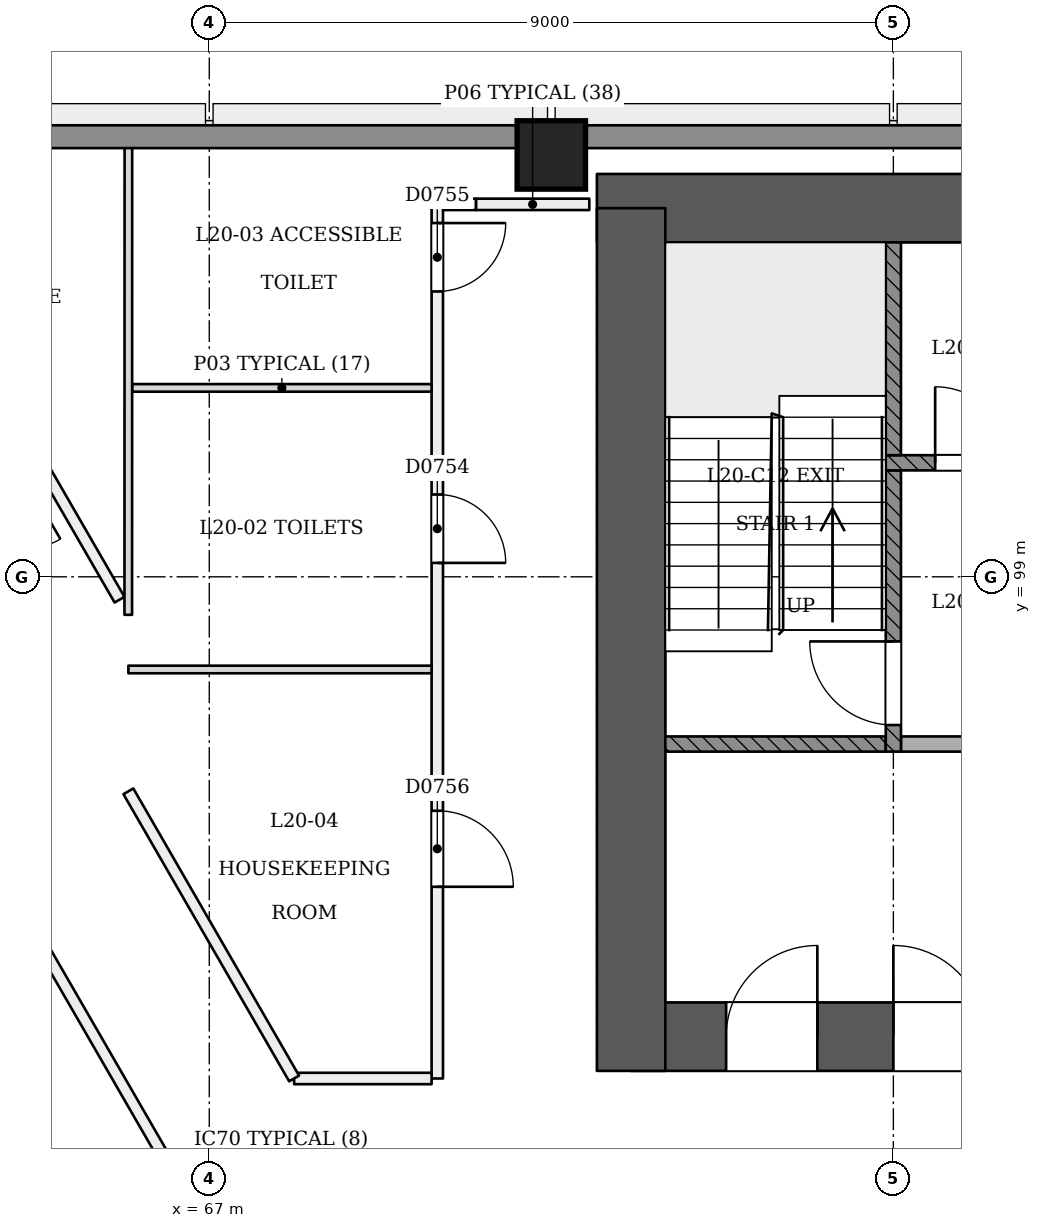
"""IFC4 building model, lengths in metres.
Left out: names, types, materials, properties, quantities, classifications, styles, units other than length and angle.
Written with IfcOpenShell. Run it as: python <this file> out.ifc"""

import sys

from ifc_helpers import new_model, si_unit, direction, frame, frame_2d, origin, origin_2d, place, context, subcontext, project, spatial, rectangle, extrude, element, fill, save


model = new_model("IFC4")
c1 = context("Model", 3, precision=1e-05, world=origin(), true_north=direction((0.0, 1.0)))
c2 = subcontext(c1, "Body", "Model", "MODEL_VIEW")
j1 = project(units=[si_unit("LENGTHUNIT", "METRE"), si_unit("PLANEANGLEUNIT", "RADIAN")], contexts=[c1])
p1 = place(None, origin())
s1 = spatial("IfcSite", under=j1, at=p1, CompositionType="ELEMENT")
p2 = place(p1, origin())
s2 = spatial("IfcBuilding", under=s1, at=p2, CompositionType="ELEMENT")
p3 = place(p2, frame((0.0, 0.0, 81.0)))
s3 = spatial("IfcBuildingStorey", under=s2, at=p3, CompositionType="ELEMENT", Elevation=81.0)
p4 = place(p3, frame((72.55, 92.95, 0.0), z_axis=(0.0, 0.0, 1.0), x_axis=(1.0, 0.0, 0.0)))
e1 = element("IfcWall", 1, at=p4, inside=s3, PredefinedType="SHEAR", context=c2, shape_type="SweptSolid", body=[
    extrude(rectangle(XDim=25.35, YDim=0.9, at=frame_2d((12.675, 0.0))), origin(), (0.0, 0.0, 1.0), 3.6),
])
p5 = place(p4, frame((1.25, 0.0, 0.0)))
e2 = element("IfcOpeningElement", 2, at=p5, cuts=e1, PredefinedType="OPENING", context=c2, shape_type="SweptSolid", body=[
    extrude(rectangle(XDim=1.2, YDim=2.1, at=frame_2d((0.6, 1.05))), frame((0.0, 0.46, 0.0), z_axis=(0.0, -1.0, 0.0), x_axis=(1.0, 0.0, 0.0)), (0.0, 0.0, 1.0), 0.921),
])
p6 = place(p4, frame((3.45, 0.0, 0.0)))
e3 = element("IfcOpeningElement", 3, at=p6, cuts=e1, PredefinedType="OPENING", context=c2, shape_type="SweptSolid", body=[
    extrude(rectangle(XDim=1.2, YDim=2.1, at=frame_2d((0.6, 1.05))), frame((0.0, 0.46, 0.0), z_axis=(0.0, -1.0, 0.0), x_axis=(1.0, 0.0, 0.0)), (0.0, 0.0, 1.0), 0.921),
])
p7 = place(p4, frame((13.45, 0.0, 0.0)))
e4 = element("IfcOpeningElement", 4, at=p7, cuts=e1, PredefinedType="OPENING", context=c2, shape_type="SweptSolid", body=[
    extrude(rectangle(XDim=1.2, YDim=2.1, at=frame_2d((0.6, 1.05))), frame((0.0, 0.46, 0.0), z_axis=(0.0, -1.0, 0.0), x_axis=(1.0, 0.0, 0.0)), (0.0, 0.0, 1.0), 0.921),
])
p8 = place(p4, frame((15.913, 0.0, 0.0)))
e5 = element("IfcOpeningElement", 5, at=p8, cuts=e1, PredefinedType="OPENING", context=c2, shape_type="SweptSolid", body=[
    extrude(rectangle(XDim=1.0, YDim=2.1, at=frame_2d((0.5, 1.05))), frame((0.0, 0.46, 0.0), z_axis=(0.0, -1.0, 0.0), x_axis=(1.0, 0.0, 0.0)), (0.0, 0.0, 1.0), 0.921),
])
p9 = place(p4, frame((18.35, 0.0, 0.0)))
e6 = element("IfcOpeningElement", 6, at=p9, cuts=e1, PredefinedType="OPENING", context=c2, shape_type="SweptSolid", body=[
    extrude(rectangle(XDim=1.0, YDim=2.1, at=frame_2d((0.5, 1.05))), frame((0.0, 0.46, 0.0), z_axis=(0.0, -1.0, 0.0), x_axis=(1.0, 0.0, 0.0)), (0.0, 0.0, 1.0), 0.921),
])
p10 = place(p4, frame((20.7, 0.0, 0.0)))
e7 = element("IfcOpeningElement", 7, at=p10, cuts=e1, PredefinedType="OPENING", context=c2, shape_type="SweptSolid", body=[
    extrude(rectangle(XDim=1.0, YDim=2.1, at=frame_2d((0.5, 1.05))), frame((0.0, 0.46, 0.0), z_axis=(0.0, -1.0, 0.0), x_axis=(1.0, 0.0, 0.0)), (0.0, 0.0, 1.0), 0.921),
])
p11 = place(p4, frame((22.988, 0.0, 0.0)))
e8 = element("IfcOpeningElement", 8, at=p11, cuts=e1, PredefinedType="OPENING", context=c2, shape_type="SweptSolid", body=[
    extrude(rectangle(XDim=1.0, YDim=2.1, at=frame_2d((0.5, 1.05))), frame((0.0, 0.46, 0.0), z_axis=(0.0, -1.0, 0.0), x_axis=(1.0, 0.0, 0.0)), (0.0, 0.0, 1.0), 0.921),
])
p12 = place(p3, frame((97.45, 103.85, 0.0), z_axis=(0.0, 0.0, 1.0), x_axis=(-1.0, 0.0, 0.0)))
e9 = element("IfcWall", 9, at=p12, inside=s3, PredefinedType="SHEAR", context=c2, shape_type="SweptSolid", body=[
    extrude(rectangle(XDim=25.35, YDim=0.9, at=frame_2d((12.675, 0.0))), origin(), (0.0, 0.0, 1.0), 3.6),
])
p13 = place(p3, frame((72.55, 103.85, 0.0), z_axis=(0.0, 0.0, 1.0), x_axis=(0.0, -1.0, 0.0)))
e10 = element("IfcWall", 10, at=p13, inside=s3, PredefinedType="SHEAR", context=c2, shape_type="SweptSolid", body=[
    extrude(rectangle(XDim=11.35, YDim=0.9, at=frame_2d((5.675, 0.0))), origin(), (0.0, 0.0, 1.0), 3.6),
])
p14 = place(p3, frame((71.5, 104.55, 0.0), z_axis=(0.0, 0.0, 1.0), x_axis=(1.0, 0.0, 0.0)))
e11 = element("IfcColumn", 11, at=p14, inside=s3, PredefinedType="COLUMN", context=c2, shape_type="SweptSolid", body=[
    extrude(rectangle(XDim=0.9, YDim=0.9, at=origin_2d()), origin(), (0.0, 0.0, 1.0), 3.6),
])
p15 = place(p3, frame((72.0, 103.9, 0.0), z_axis=(0.0, 0.0, 1.0), x_axis=(-1.0, 0.0, 0.0)))
e12 = element("IfcWall", 12, at=p15, inside=s3, PredefinedType="PARTITIONING", context=c2, shape_type="SweptSolid", body=[
    extrude(rectangle(XDim=1.492, YDim=0.15, at=frame_2d((0.746, 0.0))), origin(), (0.0, 0.0, 1.0), 3.1),
])
p16 = place(p3, frame((70.508, 103.9, 0.0), z_axis=(0.0, 0.0, 1.0), x_axis=(-1.0, 0.0, 0.0)))
e13 = element("IfcWall", 13, at=p16, inside=s3, PredefinedType="PARTITIONING", context=c2, shape_type="SweptSolid", body=[
    extrude(rectangle(XDim=0.433, YDim=0.15, at=frame_2d((0.217, 0.0))), origin(), (0.0, 0.0, 1.0), 2.6),
])
p17 = place(p3, frame((70.0, 103.9, 0.0), z_axis=(0.0, 0.0, 1.0), x_axis=(0.0, -1.0, 0.0)))
e14 = element("IfcWall", 14, at=p17, inside=s3, PredefinedType="PARTITIONING", context=c2, shape_type="SweptSolid", body=[
    extrude(rectangle(XDim=11.5, YDim=0.15, at=frame_2d((5.75, 0.0))), origin(), (0.0, 0.0, 1.0), 2.6),
])
p18 = place(p17, frame((3.817, 0.0, 0.0)))
e15 = element("IfcOpeningElement", 15, at=p18, cuts=e14, PredefinedType="OPENING", context=c2, shape_type="SweptSolid", body=[
    extrude(rectangle(XDim=0.9, YDim=2.1, at=frame_2d((0.45, 1.05))), frame((0.0, 0.085, 0.0), z_axis=(0.0, -1.0, 0.0), x_axis=(1.0, 0.0, 0.0)), (0.0, 0.0, 1.0), 0.171),
])
p19 = place(p17, frame((0.246, 0.0, 0.0)))
e16 = element("IfcOpeningElement", 16, at=p19, cuts=e14, PredefinedType="OPENING", context=c2, shape_type="SweptSolid", body=[
    extrude(rectangle(XDim=0.9, YDim=2.1, at=frame_2d((0.45, 1.05))), frame((0.0, 0.085, 0.0), z_axis=(0.0, -1.0, 0.0), x_axis=(1.0, 0.0, 0.0)), (0.0, 0.0, 1.0), 0.171),
])
p20 = place(p17, frame((7.978, 0.0, 0.0)))
e17 = element("IfcOpeningElement", 17, at=p20, cuts=e14, PredefinedType="OPENING", context=c2, shape_type="SweptSolid", body=[
    extrude(rectangle(XDim=1.0, YDim=2.1, at=frame_2d((0.5, 1.05))), frame((0.0, 0.085, 0.0), z_axis=(0.0, -1.0, 0.0), x_axis=(1.0, 0.0, 0.0)), (0.0, 0.0, 1.0), 0.171),
])
p21 = place(p3, frame((69.925, 92.4, 0.0), z_axis=(0.0, 0.0, 1.0), x_axis=(-1.0, 0.0, 0.0)))
e18 = element("IfcWall", 18, at=p21, inside=s3, PredefinedType="PARTITIONING", context=c2, shape_type="SweptSolid", body=[
    extrude(rectangle(XDim=1.809, YDim=0.15, at=frame_2d((0.904, 0.0))), origin(), (0.0, 0.0, 1.0), 3.1),
])
p22 = place(p3, frame((68.116, 92.4, 0.0), z_axis=(0.0, 0.0, 1.0), x_axis=(-0.499787053524, 0.866148313587, 0.0)))
e19 = element("IfcWall", 19, at=p22, inside=s3, PredefinedType="PARTITIONING", context=c2, shape_type="SweptSolid", body=[
    extrude(rectangle(XDim=4.362, YDim=0.15, at=frame_2d((2.181, 0.0))), origin(), (0.0, 0.0, 1.0), 3.1),
])
p23 = place(p3, frame((65.819, 98.699, 0.0), z_axis=(0.0, 0.0, 1.0), x_axis=(-0.499990056298, 0.866031144707, 0.0)))
e20 = element("IfcWall", 20, at=p23, inside=s3, PredefinedType="PARTITIONING", context=c2, shape_type="SweptSolid", body=[
    extrude(rectangle(XDim=2.08, YDim=0.15, at=frame_2d((1.04, 0.0))), origin(), (0.0, 0.0, 1.0), 3.1),
])
p24 = place(p3, frame((62.955, 97.34, 0.0), z_axis=(0.0, 0.0, 1.0), x_axis=(0.500000604257, -0.866025054916, 0.0)))
e21 = element("IfcWall", 21, at=p24, inside=s3, PredefinedType="PARTITIONING", context=c2, shape_type="SweptSolid", body=[
    extrude(rectangle(XDim=42.75, YDim=0.15, at=frame_2d((21.375, 0.0))), origin(), (0.0, 0.0, 1.0), 2.7),
])
p25 = place(p24, frame((0.245, 0.0, 0.0)))
e22 = element("IfcOpeningElement", 22, at=p25, cuts=e21, PredefinedType="OPENING", context=c2, shape_type="SweptSolid", body=[
    extrude(rectangle(XDim=1.2, YDim=2.1, at=frame_2d((0.6, 1.05))), frame((0.0, 0.085, 0.0), z_axis=(0.0, -1.0, 0.0), x_axis=(1.0, 0.0, 0.0)), (0.0, 0.0, 1.0), 0.171),
])
p26 = place(p24, frame((8.375, 0.0, 0.0)))
e23 = element("IfcOpeningElement", 23, at=p26, cuts=e21, PredefinedType="OPENING", context=c2, shape_type="SweptSolid", body=[
    extrude(rectangle(XDim=1.2, YDim=2.1, at=frame_2d((0.6, 1.05))), frame((0.0, 0.085, 0.0), z_axis=(0.0, -1.0, 0.0), x_axis=(1.0, 0.0, 0.0)), (0.0, 0.0, 1.0), 0.171),
])
p27 = place(p24, frame((14.125, 0.0, 0.0)))
e24 = element("IfcOpeningElement", 24, at=p27, cuts=e21, PredefinedType="OPENING", context=c2, shape_type="SweptSolid", body=[
    extrude(rectangle(XDim=1.0, YDim=2.1, at=frame_2d((0.5, 1.05))), frame((0.0, 0.085, 0.0), z_axis=(0.0, -1.0, 0.0), x_axis=(1.0, 0.0, 0.0)), (0.0, 0.0, 1.0), 0.171),
])
p28 = place(p24, frame((18.625, 0.0, 0.0)))
e25 = element("IfcOpeningElement", 25, at=p28, cuts=e21, PredefinedType="OPENING", context=c2, shape_type="SweptSolid", body=[
    extrude(rectangle(XDim=1.0, YDim=2.1, at=frame_2d((0.5, 1.05))), frame((0.0, 0.085, 0.0), z_axis=(0.0, -1.0, 0.0), x_axis=(1.0, 0.0, 0.0)), (0.0, 0.0, 1.0), 0.171),
])
p29 = place(p24, frame((26.375, 0.0, 0.0)))
e26 = element("IfcOpeningElement", 26, at=p29, cuts=e21, PredefinedType="OPENING", context=c2, shape_type="SweptSolid", body=[
    extrude(rectangle(XDim=1.2, YDim=2.1, at=frame_2d((0.6, 1.05))), frame((0.0, 0.085, 0.0), z_axis=(0.0, -1.0, 0.0), x_axis=(1.0, 0.0, 0.0)), (0.0, 0.0, 1.0), 0.171),
])
p30 = place(p24, frame((30.946, 0.0, 0.0)))
e27 = element("IfcOpeningElement", 27, at=p30, cuts=e21, PredefinedType="OPENING", context=c2, shape_type="SweptSolid", body=[
    extrude(rectangle(XDim=1.1, YDim=2.1, at=frame_2d((0.55, 1.05))), frame((0.0, 0.085, 0.0), z_axis=(0.0, -1.0, 0.0), x_axis=(1.0, 0.0, 0.0)), (0.0, 0.0, 1.0), 0.171),
])
p31 = place(p24, frame((36.625, 0.0, 0.0)))
e28 = element("IfcOpeningElement", 28, at=p31, cuts=e21, PredefinedType="OPENING", context=c2, shape_type="SweptSolid", body=[
    extrude(rectangle(XDim=1.0, YDim=2.1, at=frame_2d((0.5, 1.05))), frame((0.0, 0.085, 0.0), z_axis=(0.0, -1.0, 0.0), x_axis=(1.0, 0.0, 0.0)), (0.0, 0.0, 1.0), 0.171),
])
p32 = place(p24, frame((41.329, 0.0, 0.0)))
e29 = element("IfcOpeningElement", 29, at=p32, cuts=e21, PredefinedType="OPENING", context=c2, shape_type="SweptSolid", body=[
    extrude(rectangle(XDim=1.2, YDim=2.1, at=frame_2d((0.6, 1.05))), frame((0.0, 0.085, 0.0), z_axis=(0.0, -1.0, 0.0), x_axis=(1.0, 0.0, 0.0)), (0.0, 0.0, 1.0), 0.171),
])
p33 = place(p3, frame((69.925, 101.486, 0.0), z_axis=(0.0, 0.0, 1.0), x_axis=(-1.0, 0.0, 0.0)))
e30 = element("IfcWall", 30, at=p33, inside=s3, PredefinedType="PARTITIONING", context=c2, shape_type="SweptSolid", body=[
    extrude(rectangle(XDim=3.94, YDim=0.1, at=frame_2d((1.97, 0.0))), origin(), (0.0, 0.0, 1.0), 3.1),
])
p34 = place(p3, frame((65.936, 97.781, 0.0), z_axis=(0.0, 0.0, 1.0), x_axis=(1.0, 0.0, 0.0)))
e31 = element("IfcWall", 31, at=p34, inside=s3, PredefinedType="PARTITIONING", context=c2, shape_type="SweptSolid", body=[
    extrude(rectangle(XDim=3.989, YDim=0.1, at=frame_2d((1.995, 0.0))), origin(), (0.0, 0.0, 1.0), 3.1),
])
p35 = place(p3, frame((65.936, 104.9, 0.0), z_axis=(0.0, 0.0, 1.0), x_axis=(-0.000267032874, -0.999999964347, 0.0)))
e32 = element("IfcWall", 32, at=p35, inside=s3, PredefinedType="PARTITIONING", context=c2, shape_type="SweptSolid", body=[
    extrude(rectangle(XDim=6.4, YDim=0.1, at=frame_2d((3.2, 0.0))), origin(), (0.0, 0.0, 1.0), 2.6),
])
p36 = place(p3, frame((59.872, 104.79, 0.0), z_axis=(0.0, 0.0, 1.0), x_axis=(1.0, 0.0, 0.0)))
e33 = element("IfcWall", 33, at=p36, inside=s3, PredefinedType="SOLIDWALL", context=c2, shape_type="SweptSolid", body=[
    extrude(rectangle(XDim=50.256, YDim=0.3, at=frame_2d((25.128, 0.0))), origin(), (0.0, 0.0, 1.0), 2.6),
])
p37 = place(p3, frame((73.0, 96.8, 0.0), z_axis=(0.0, 0.0, 1.0), x_axis=(1.0, 0.0, 0.0)))
e34 = element("IfcWall", 34, at=p37, inside=s3, PredefinedType="SOLIDWALL", context=c2, shape_type="SweptSolid", body=[
    extrude(rectangle(XDim=2.9, YDim=0.2, at=frame_2d((1.45, 0.0))), origin(), (0.0, 0.0, 1.0), 3.1),
])
p38 = place(p3, frame((76.0, 96.7, 0.0), z_axis=(0.0, 0.0, 1.0), x_axis=(0.0, 1.0, 0.0)))
e35 = element("IfcWall", 35, at=p38, inside=s3, PredefinedType="SOLIDWALL", context=c2, shape_type="SweptSolid", body=[
    extrude(rectangle(XDim=3.7, YDim=0.2, at=frame_2d((1.85, 0.0))), origin(), (0.0, 0.0, 1.0), 3.1),
])
p39 = place(p38, frame((0.35, 0.0, 0.0)))
e36 = element("IfcOpeningElement", 36, at=p39, cuts=e35, PredefinedType="OPENING", context=c2, shape_type="SweptSolid", body=[
    extrude(rectangle(XDim=1.1, YDim=2.1, at=frame_2d((0.55, 1.05))), frame((0.0, 0.11, 0.0), z_axis=(0.0, -1.0, 0.0), x_axis=(1.0, 0.0, 0.0)), (0.0, 0.0, 1.0), 0.221),
])
p40 = place(p3, frame((76.1, 96.8, 0.0), z_axis=(0.0, 0.0, 1.0), x_axis=(1.0, 0.0, 0.0)))
e37 = element("IfcWall", 37, at=p40, inside=s3, PredefinedType="PARTITIONING", context=c2, shape_type="SweptSolid", body=[
    extrude(rectangle(XDim=1.9, YDim=0.2, at=frame_2d((0.95, 0.0))), origin(), (0.0, 0.0, 1.0), 3.1),
])
p41 = place(p3, frame((75.9, 100.5, 0.0), z_axis=(0.0, 0.0, 1.0), x_axis=(1.0, 0.0, 0.0)))
e38 = element("IfcWall", 38, at=p41, inside=s3, PredefinedType="SOLIDWALL", context=c2, shape_type="SweptSolid", body=[
    extrude(rectangle(XDim=18.2, YDim=0.2, at=frame_2d((9.1, 0.0))), origin(), (0.0, 0.0, 1.0), 3.1),
])
p42 = place(p41, frame((2.6, 0.0, 0.0)))
e39 = element("IfcOpeningElement", 39, at=p42, cuts=e38, PredefinedType="OPENING", context=c2, shape_type="SweptSolid", body=[
    extrude(rectangle(XDim=1.1, YDim=2.1, at=frame_2d((0.55, 1.05))), frame((0.0, 0.11, 0.0), z_axis=(0.0, -1.0, 0.0), x_axis=(1.0, 0.0, 0.0)), (0.0, 0.0, 1.0), 0.221),
])
p43 = place(p41, frame((4.5, 0.0, 0.0)))
e40 = element("IfcOpeningElement", 40, at=p43, cuts=e38, PredefinedType="OPENING", context=c2, shape_type="SweptSolid", body=[
    extrude(rectangle(XDim=1.1, YDim=2.1, at=frame_2d((0.55, 1.05))), frame((0.0, 0.11, 0.0), z_axis=(0.0, -1.0, 0.0), x_axis=(1.0, 0.0, 0.0)), (0.0, 0.0, 1.0), 0.221),
])
p44 = place(p41, frame((6.4, 0.0, 0.0)))
e41 = element("IfcOpeningElement", 41, at=p44, cuts=e38, PredefinedType="OPENING", context=c2, shape_type="SweptSolid", body=[
    extrude(rectangle(XDim=1.1, YDim=2.1, at=frame_2d((0.55, 1.05))), frame((0.0, 0.11, 0.0), z_axis=(0.0, -1.0, 0.0), x_axis=(1.0, 0.0, 0.0)), (0.0, 0.0, 1.0), 0.221),
])
p45 = place(p41, frame((8.3, 0.0, 0.0)))
e42 = element("IfcOpeningElement", 42, at=p45, cuts=e38, PredefinedType="OPENING", context=c2, shape_type="SweptSolid", body=[
    extrude(rectangle(XDim=1.1, YDim=2.1, at=frame_2d((0.55, 1.05))), frame((0.0, 0.11, 0.0), z_axis=(0.0, -1.0, 0.0), x_axis=(1.0, 0.0, 0.0)), (0.0, 0.0, 1.0), 0.221),
])
p46 = place(p41, frame((10.2, 0.0, 0.0)))
e43 = element("IfcOpeningElement", 43, at=p46, cuts=e38, PredefinedType="OPENING", context=c2, shape_type="SweptSolid", body=[
    extrude(rectangle(XDim=1.1, YDim=2.1, at=frame_2d((0.55, 1.05))), frame((0.0, 0.11, 0.0), z_axis=(0.0, -1.0, 0.0), x_axis=(1.0, 0.0, 0.0)), (0.0, 0.0, 1.0), 0.221),
])
p47 = place(p41, frame((12.1, 0.0, 0.0)))
e44 = element("IfcOpeningElement", 44, at=p47, cuts=e38, PredefinedType="OPENING", context=c2, shape_type="SweptSolid", body=[
    extrude(rectangle(XDim=1.1, YDim=2.1, at=frame_2d((0.55, 1.05))), frame((0.0, 0.11, 0.0), z_axis=(0.0, -1.0, 0.0), x_axis=(1.0, 0.0, 0.0)), (0.0, 0.0, 1.0), 0.221),
])
p48 = place(p41, frame((14.0, 0.0, 0.0)))
e45 = element("IfcOpeningElement", 45, at=p48, cuts=e38, PredefinedType="OPENING", context=c2, shape_type="SweptSolid", body=[
    extrude(rectangle(XDim=1.1, YDim=2.1, at=frame_2d((0.55, 1.05))), frame((0.0, 0.11, 0.0), z_axis=(0.0, -1.0, 0.0), x_axis=(1.0, 0.0, 0.0)), (0.0, 0.0, 1.0), 0.221),
])
p49 = place(p41, frame((0.65, 0.0, 0.0)))
e46 = element("IfcOpeningElement", 46, at=p49, cuts=e38, PredefinedType="OPENING", context=c2, shape_type="SweptSolid", body=[
    extrude(rectangle(XDim=1.0, YDim=2.1, at=frame_2d((0.5, 1.05))), frame((0.0, 0.11, 0.0), z_axis=(0.0, -1.0, 0.0), x_axis=(1.0, 0.0, 0.0)), (0.0, 0.0, 1.0), 0.221),
])
p50 = place(p41, frame((16.3, 0.0, 0.0)))
e47 = element("IfcOpeningElement", 47, at=p50, cuts=e38, PredefinedType="OPENING", context=c2, shape_type="SweptSolid", body=[
    extrude(rectangle(XDim=1.0, YDim=2.1, at=frame_2d((0.5, 1.05))), frame((0.0, 0.11, 0.0), z_axis=(0.0, -1.0, 0.0), x_axis=(1.0, 0.0, 0.0)), (0.0, 0.0, 1.0), 0.221),
])
p51 = place(p3, frame((76.0, 100.6, 0.0), z_axis=(0.0, 0.0, 1.0), x_axis=(0.0, 1.0, 0.0)))
e48 = element("IfcWall", 48, at=p51, inside=s3, PredefinedType="SOLIDWALL", context=c2, shape_type="SweptSolid", body=[
    extrude(rectangle(XDim=2.8, YDim=0.2, at=frame_2d((1.4, 0.0))), origin(), (0.0, 0.0, 1.0), 3.1),
])
p52 = place(p18, origin())
e49 = element("IfcDoor", 49, at=p52, inside=s3, OperationType="SINGLE_SWING_RIGHT", PredefinedType="NOTDEFINED", context=c2, shape_type="SweptSolid", body=[
    extrude(rectangle(XDim=0.9, YDim=2.1, at=frame_2d((0.45, 1.05))), frame((0.0, 0.025, 0.0), z_axis=(0.0, -1.0, 0.0), x_axis=(1.0, 0.0, 0.0)), (0.0, 0.0, 1.0), 0.05),
])
fill(e15, e49)
p53 = place(p19, origin())
e50 = element("IfcDoor", 50, at=p53, inside=s3, OperationType="SINGLE_SWING_LEFT", PredefinedType="NOTDEFINED", context=c2, shape_type="SweptSolid", body=[
    extrude(rectangle(XDim=0.9, YDim=2.1, at=frame_2d((0.45, 1.05))), frame((0.0, 0.025, 0.0), z_axis=(0.0, -1.0, 0.0), x_axis=(1.0, 0.0, 0.0)), (0.0, 0.0, 1.0), 0.05),
])
fill(e16, e50)
p54 = place(p20, origin())
e51 = element("IfcDoor", 51, at=p54, inside=s3, OperationType="SINGLE_SWING_RIGHT", PredefinedType="NOTDEFINED", context=c2, shape_type="SweptSolid", body=[
    extrude(rectangle(XDim=1.0, YDim=2.1, at=frame_2d((0.5, 1.05))), frame((0.0, 0.025, 0.0), z_axis=(0.0, -1.0, 0.0), x_axis=(1.0, 0.0, 0.0)), (0.0, 0.0, 1.0), 0.05),
])
fill(e17, e51)
p55 = place(p39, origin())
e52 = element("IfcDoor", 52, at=p55, inside=s3, OperationType="SINGLE_SWING_RIGHT", PredefinedType="NOTDEFINED", context=c2, shape_type="SweptSolid", body=[
    extrude(rectangle(XDim=1.1, YDim=2.1, at=frame_2d((0.55, 1.05))), frame((0.0, 0.025, 0.0), z_axis=(0.0, -1.0, 0.0), x_axis=(1.0, 0.0, 0.0)), (0.0, 0.0, 1.0), 0.05),
])
fill(e36, e52)
p56 = place(p5, origin())
e53 = element("IfcDoor", 53, at=p56, inside=s3, OperationType="SINGLE_SWING_RIGHT", PredefinedType="NOTDEFINED", context=c2, shape_type="SweptSolid", body=[
    extrude(rectangle(XDim=1.2, YDim=2.1, at=frame_2d((0.6, 1.05))), frame((0.0, 0.025, 0.0), z_axis=(0.0, -1.0, 0.0), x_axis=(1.0, 0.0, 0.0)), (0.0, 0.0, 1.0), 0.05),
])
fill(e2, e53)
p57 = place(p6, origin())
e54 = element("IfcDoor", 54, at=p57, inside=s3, OperationType="SINGLE_SWING_LEFT", PredefinedType="NOTDEFINED", context=c2, shape_type="SweptSolid", body=[
    extrude(rectangle(XDim=1.2, YDim=2.1, at=frame_2d((0.6, 1.05))), frame((0.0, 0.025, 0.0), z_axis=(0.0, -1.0, 0.0), x_axis=(1.0, 0.0, 0.0)), (0.0, 0.0, 1.0), 0.05),
])
fill(e3, e54)
p58 = place(p49, origin())
e55 = element("IfcDoor", 55, at=p58, inside=s3, OperationType="SINGLE_SWING_LEFT", PredefinedType="NOTDEFINED", context=c2, shape_type="SweptSolid", body=[
    extrude(rectangle(XDim=1.0, YDim=2.1, at=frame_2d((0.5, 1.05))), frame((0.0, 0.025, 0.0), z_axis=(0.0, -1.0, 0.0), x_axis=(1.0, 0.0, 0.0)), (0.0, 0.0, 1.0), 0.05),
])
fill(e46, e55)
save(model, sys.argv[1])
